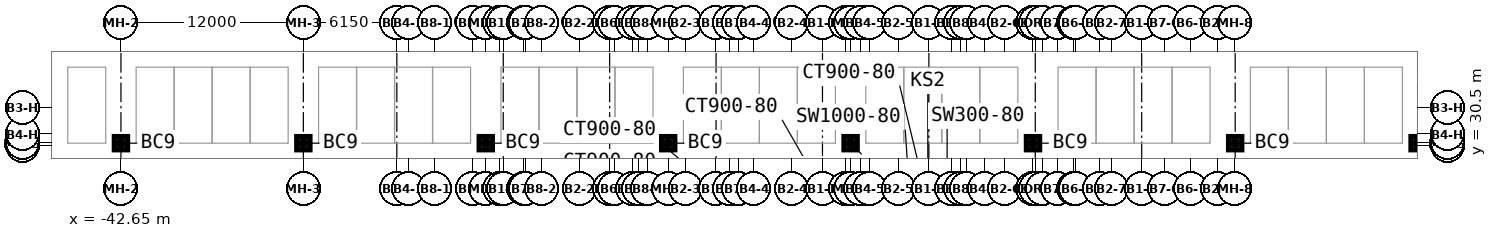
"""IFC4 building model, lengths in metres.
Left out: names, types, materials, properties, quantities, classifications, styles, units other than length and angle.
Written with IfcOpenShell. Run it as: python <this file> out.ifc"""

import sys

from ifc_helpers import new_model, si_unit, direction, frame, origin, origin_2d, place, context, subcontext, project, spatial, rectangle, extrude, source, transform, mapped, element, save


model = new_model("IFC4")
c1 = context("Model", 3, precision=1e-05, world=origin(), true_north=direction((0.0, 1.0)))
c2 = subcontext(c1, "Body", "Model", "MODEL_VIEW")
j1 = project(units=[si_unit("LENGTHUNIT", "METRE"), si_unit("PLANEANGLEUNIT", "RADIAN")], contexts=[c1])
p1 = place(None, origin())
s1 = spatial("IfcSite", under=j1, at=p1, CompositionType="ELEMENT")
p2 = place(p1, origin())
s2 = spatial("IfcBuilding", under=s1, at=p2, CompositionType="ELEMENT")
p3 = place(p2, frame((0.0, 0.0, -4.5)))
s3 = spatial("IfcBuildingStorey", under=s2, at=p3, CompositionType="ELEMENT", Elevation=-4.5)
m1 = source(origin(), c2, "Body", "SweptSolid", [
    extrude(rectangle(XDim=0.9, YDim=0.9, at=origin_2d()), origin(), (0.0, 0.0, 1.0), 4.5),
])
for number, where, z_axis, x_axis in (
    (1, (-42.65, 30.65, 0.0), (0.0, 0.0, 1.0), (1.0, 0.0, 0.0)),
    (2, (-30.65, 30.65, 0.0), (0.0, 0.0, 1.0), (1.0, 0.0, 0.0)),
    (3, (-18.65, 30.65, 0.0), (0.0, 0.0, 1.0), (1.0, 0.0, 0.0)),
    (4, (-6.65, 30.65, 0.0), (0.0, 0.0, 1.0), (1.0, 0.0, 0.0)),
    (5, (5.35, 30.65, 0.0), (0.0, 0.0, 1.0), (1.0, 0.0, 0.0)),
    (6, (17.35, 30.65, 0.0), (0.0, 0.0, 1.0), (1.0, 0.0, 0.0)),
    (7, (30.65, 30.65, 0.0), (0.0, 0.0, 1.0), (1.0, 0.0, 0.0)),
    (8, (42.65, 30.65, 0.0), (0.0, 0.0, 1.0), (1.0, 0.0, 0.0)),
):
    element("IfcColumn", number, at=place(p3, frame(where, z_axis=z_axis, x_axis=x_axis)), inside=s3, PredefinedType="COLUMN", context=c2, shape_type="MappedRepresentation", body=[
        mapped(m1, transform((0.0, 0.0, 0.0))),
    ])
save(model, sys.argv[1])
